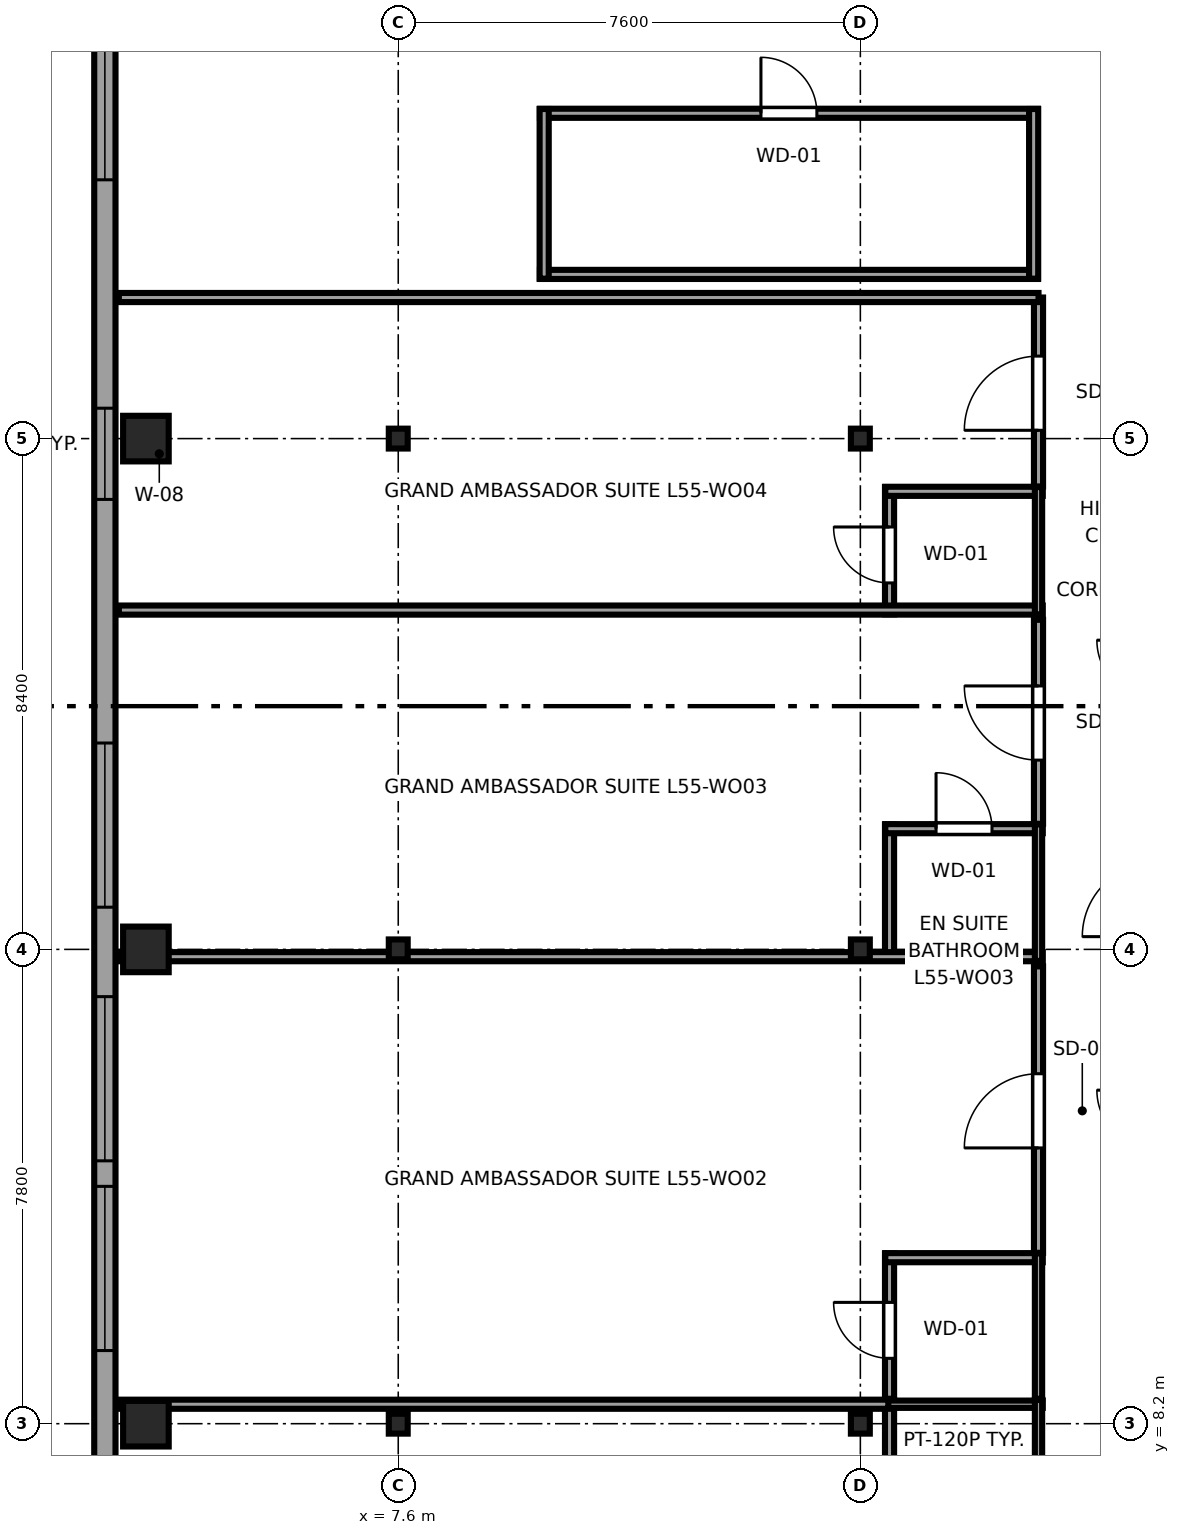
"""IFC4 building model, lengths in metres.
Left out: names, types, materials, properties, quantities, classifications, styles, units other than length and angle.
Written with IfcOpenShell. Run it as: python <this file> out.ifc"""

import sys

from ifc_helpers import new_model, si_unit, direction, frame, frame_2d, origin, origin_2d, place, context, subcontext, project, spatial, rectangle, i_section, extrude, source, transform, mapped, element, fill, save


model = new_model("IFC4")
c1 = context("Model", 3, precision=1e-05, world=origin(), true_north=direction((0.0, 1.0)))
c2 = subcontext(c1, "Body", "Model", "MODEL_VIEW")
j1 = project(units=[si_unit("LENGTHUNIT", "METRE"), si_unit("PLANEANGLEUNIT", "RADIAN")], contexts=[c1])
p1 = place(None, origin())
s1 = spatial("IfcSite", under=j1, at=p1, CompositionType="ELEMENT")
p2 = place(p1, origin())
s2 = spatial("IfcBuilding", under=s1, at=p2, CompositionType="ELEMENT")
p3 = place(p2, frame((0.0, 0.0, 209.7)))
s3 = spatial("IfcBuildingStorey", under=s2, at=p3, CompositionType="ELEMENT", Elevation=209.7)
m1 = source(origin(), c2, "Body", "SweptSolid", [
    extrude(rectangle(XDim=0.75, YDim=0.75, at=origin_2d()), origin(), (0.0, 0.0, 1.0), 3.55),
])
for number, where, z_axis, x_axis in (
    (1, (3.45, 8.2, 0.0), (0.0, 0.0, 1.0), (1.0, 0.0, 0.0)),
    (2, (3.45, 16.0, 0.0), (0.0, 0.0, 1.0), (1.0, 0.0, 0.0)),
    (3, (3.45, 24.4, 0.0), (0.0, 0.0, 1.0), (1.0, 0.0, 0.0)),
):
    element("IfcColumn", number, at=place(p3, frame(where, z_axis=z_axis, x_axis=x_axis)), inside=s3, PredefinedType="COLUMN", context=c2, shape_type="MappedRepresentation", body=[
        mapped(m1, transform((0.0, 0.0, 0.0), x_axis=(1.0, 0.0, 0.0), y_axis=(0.0, 1.0, 0.0), z_axis=(0.0, 0.0, 1.0), scale=1.0)),
    ])
m2 = source(origin(), c2, "Body", "SweptSolid", [
    extrude(i_section(OverallWidth=0.311, OverallDepth=0.327, WebThickness=0.016, FlangeThickness=0.025, FilletRadius=0.017, at=origin_2d()), origin(), (0.0, 0.0, 1.0), 3.55),
])
for number, where, z_axis, x_axis in (
    (4, (7.6, 8.2, 0.0), (0.0, 0.0, 1.0), (1.0, 0.0, 0.0)),
    (5, (7.6, 16.0, 0.0), (0.0, 0.0, 1.0), (1.0, 0.0, 0.0)),
    (6, (7.6, 24.4, 0.0), (0.0, 0.0, 1.0), (1.0, 0.0, 0.0)),
    (7, (15.2, 8.2, 0.0), (0.0, 0.0, 1.0), (1.0, 0.0, 0.0)),
    (8, (15.2, 16.0, 0.0), (0.0, 0.0, 1.0), (1.0, 0.0, 0.0)),
    (9, (15.2, 24.4, 0.0), (0.0, 0.0, 1.0), (1.0, 0.0, 0.0)),
):
    element("IfcColumn", number, at=place(p3, frame(where, z_axis=z_axis, x_axis=x_axis)), inside=s3, PredefinedType="COLUMN", context=c2, shape_type="MappedRepresentation", body=[
        mapped(m2, transform((0.0, 0.0, 0.0), x_axis=(1.0, 0.0, 0.0), y_axis=(0.0, 1.0, 0.0), z_axis=(0.0, 0.0, 1.0), scale=1.0)),
    ])
p4 = place(p3, frame((2.775, 41.583, 0.0), z_axis=(0.0, 0.0, 1.0), x_axis=(0.0, -1.0, 0.0)))
e10 = element("IfcWall", 10, at=p4, inside=s3, PredefinedType="SOLIDWALL", context=c2, shape_type="SweptSolid", body=[
    extrude(rectangle(XDim=34.566, YDim=0.35, at=frame_2d((17.283, 0.0))), origin(), (0.0, 0.0, 1.0), 3.37),
])
p5 = place(p4, frame((10.227, 0.0, 0.68)))
e11 = element("IfcOpeningElement", 11, at=p5, cuts=e10, PredefinedType="OPENING", context=c2, shape_type="SweptSolid", body=[
    extrude(rectangle(XDim=2.7, YDim=1.95, at=frame_2d((1.35, 0.975))), frame((0.0, 0.185, 0.0), z_axis=(0.0, -1.0, 0.0), x_axis=(1.0, 0.0, 0.0)), (0.0, 0.0, 1.0), 0.37),
])
p6 = place(p4, frame((22.189, 0.0, 0.68)))
e12 = element("IfcOpeningElement", 12, at=p6, cuts=e10, PredefinedType="OPENING", context=c2, shape_type="SweptSolid", body=[
    extrude(rectangle(XDim=2.7, YDim=1.95, at=frame_2d((1.35, 0.975))), frame((0.0, 0.185, 0.0), z_axis=(0.0, -1.0, 0.0), x_axis=(1.0, 0.0, 0.0)), (0.0, 0.0, 1.0), 0.37),
])
p7 = place(p4, frame((26.36, 0.0, 0.68)))
e13 = element("IfcOpeningElement", 13, at=p7, cuts=e10, PredefinedType="OPENING", context=c2, shape_type="SweptSolid", body=[
    extrude(rectangle(XDim=2.7, YDim=1.95, at=frame_2d((1.35, 0.975))), frame((0.0, 0.185, 0.0), z_axis=(0.0, -1.0, 0.0), x_axis=(1.0, 0.0, 0.0)), (0.0, 0.0, 1.0), 0.37),
])
p8 = place(p4, frame((29.48, 0.0, 0.68)))
e14 = element("IfcOpeningElement", 14, at=p8, cuts=e10, PredefinedType="OPENING", context=c2, shape_type="SweptSolid", body=[
    extrude(rectangle(XDim=2.7, YDim=1.95, at=frame_2d((1.35, 0.975))), frame((0.0, 0.185, 0.0), z_axis=(0.0, -1.0, 0.0), x_axis=(1.0, 0.0, 0.0)), (0.0, 0.0, 1.0), 0.37),
])
p9 = place(p4, frame((16.683, 0.0, 0.62)))
e15 = element("IfcOpeningElement", 15, at=p9, cuts=e10, PredefinedType="OPENING", context=c2, shape_type="SweptSolid", body=[
    extrude(rectangle(XDim=1.5, YDim=1.55, at=frame_2d((0.75, 0.775))), frame((0.0, 0.185, 0.0), z_axis=(0.0, -1.0, 0.0), x_axis=(1.0, 0.0, 0.0)), (0.0, 0.0, 1.0), 0.37),
])
p10 = place(p3, frame((15.68, 6.383, 0.0), z_axis=(0.0, 0.0, 1.0), x_axis=(0.0, 1.0, 0.0)))
e16 = element("IfcWall", 16, at=p10, inside=s3, PredefinedType="PARTITIONING", context=c2, shape_type="SweptSolid", body=[
    extrude(rectangle(XDim=2.207, YDim=0.15, at=frame_2d((1.104, 0.0))), origin(), (0.0, 0.0, 1.0), 3.37),
])
p11 = place(p3, frame((15.61, 8.52, 0.0), z_axis=(0.0, 0.0, 1.0), x_axis=(1.0, 0.0, 0.0)))
e17 = element("IfcWall", 17, at=p11, inside=s3, PredefinedType="PLUMBINGWALL", context=c2, shape_type="SweptSolid", body=[
    extrude(rectangle(XDim=2.59, YDim=0.12, at=frame_2d((1.295, 0.0))), origin(), (0.0, 0.0, 1.0), 3.37),
])
p12 = place(p3, frame((18.13, 6.383, 0.0), z_axis=(0.0, 0.0, 1.0), x_axis=(0.0, 1.0, 0.0)))
e18 = element("IfcWall", 18, at=p12, inside=s3, PredefinedType="PLUMBINGWALL", context=c2, shape_type="SweptSolid", body=[
    extrude(rectangle(XDim=2.207, YDim=0.12, at=frame_2d((1.104, 0.0))), origin(), (0.0, 0.0, 1.0), 3.37),
])
p13 = place(p3, frame((15.68, 8.61, 0.0), z_axis=(0.0, 0.0, 1.0), x_axis=(0.0, 1.0, 0.0)))
e19 = element("IfcWall", 19, at=p13, inside=s3, PredefinedType="PARTITIONING", context=c2, shape_type="SweptSolid", body=[
    extrude(rectangle(XDim=2.39, YDim=0.15, at=frame_2d((1.195, 0.0))), origin(), (0.0, 0.0, 1.0), 3.37),
])
p14 = place(p13, frame((0.665, 0.0, 0.0)))
e20 = element("IfcOpeningElement", 20, at=p14, cuts=e19, PredefinedType="OPENING", context=c2, shape_type="SweptSolid", body=[
    extrude(rectangle(XDim=0.92, YDim=2.01, at=frame_2d((0.46, 1.005))), frame((0.0, 0.085, 0.0), z_axis=(0.0, -1.0, 0.0), x_axis=(1.0, 0.0, 0.0)), (0.0, 0.0, 1.0), 0.17),
])
p15 = place(p3, frame((15.61, 10.93, 0.0), z_axis=(0.0, 0.0, 1.0), x_axis=(1.0, 0.0, 0.0)))
e21 = element("IfcWall", 21, at=p15, inside=s3, PredefinedType="PARTITIONING", context=c2, shape_type="SweptSolid", body=[
    extrude(rectangle(XDim=2.59, YDim=0.15, at=frame_2d((1.295, 0.0))), origin(), (0.0, 0.0, 1.0), 3.37),
])
p16 = place(p3, frame((18.13, 8.61, 0.0), z_axis=(0.0, 0.0, 1.0), x_axis=(0.0, 1.0, 0.0)))
e22 = element("IfcWall", 22, at=p16, inside=s3, PredefinedType="PLUMBINGWALL", context=c2, shape_type="SweptSolid", body=[
    extrude(rectangle(XDim=2.39, YDim=0.12, at=frame_2d((1.195, 0.0))), origin(), (0.0, 0.0, 1.0), 3.37),
])
p17 = place(p3, frame((15.68, 15.81, 0.0), z_axis=(0.0, 0.0, 1.0), x_axis=(0.0, 1.0, 0.0)))
e23 = element("IfcWall", 23, at=p17, inside=s3, PredefinedType="PARTITIONING", context=c2, shape_type="SweptSolid", body=[
    extrude(rectangle(XDim=2.245, YDim=0.15, at=frame_2d((1.123, 0.0))), origin(), (0.0, 0.0, 1.0), 3.37),
])
p18 = place(p3, frame((3.005, 15.88, 0.0), z_axis=(0.0, 0.0, 1.0), x_axis=(1.0, 0.0, 0.0)))
e24 = element("IfcWall", 24, at=p18, inside=s3, PredefinedType="PARTITIONING", context=c2, shape_type="SweptSolid", body=[
    extrude(rectangle(XDim=15.195, YDim=0.15, at=frame_2d((7.598, 0.0))), origin(), (0.0, 0.0, 1.0), 2.758),
])
p19 = place(p3, frame((15.61, 17.985, 0.0), z_axis=(0.0, 0.0, 1.0), x_axis=(1.0, 0.0, 0.0)))
e25 = element("IfcWall", 25, at=p19, inside=s3, PredefinedType="PARTITIONING", context=c2, shape_type="SweptSolid", body=[
    extrude(rectangle(XDim=2.59, YDim=0.15, at=frame_2d((1.295, 0.0))), origin(), (0.0, 0.0, 1.0), 3.37),
])
p20 = place(p19, frame((0.835, 0.0, 0.0)))
e26 = element("IfcOpeningElement", 26, at=p20, cuts=e25, PredefinedType="OPENING", context=c2, shape_type="SweptSolid", body=[
    extrude(rectangle(XDim=0.92, YDim=2.01, at=frame_2d((0.46, 1.005))), frame((0.0, 0.085, 0.0), z_axis=(0.0, -1.0, 0.0), x_axis=(1.0, 0.0, 0.0)), (0.0, 0.0, 1.0), 0.17),
])
p21 = place(p3, frame((18.13, 15.81, 0.0), z_axis=(0.0, 0.0, 1.0), x_axis=(0.0, 1.0, 0.0)))
e27 = element("IfcWall", 27, at=p21, inside=s3, PredefinedType="PLUMBINGWALL", context=c2, shape_type="SweptSolid", body=[
    extrude(rectangle(XDim=2.245, YDim=0.12, at=frame_2d((1.123, 0.0))), origin(), (0.0, 0.0, 1.0), 3.37),
])
p22 = place(p3, frame((15.68, 21.51, 0.0), z_axis=(0.0, 0.0, 1.0), x_axis=(0.0, 1.0, 0.0)))
e28 = element("IfcWall", 28, at=p22, inside=s3, PredefinedType="PARTITIONING", context=c2, shape_type="SweptSolid", body=[
    extrude(rectangle(XDim=2.093, YDim=0.15, at=frame_2d((1.046, 0.0))), origin(), (0.0, 0.0, 1.0), 3.37),
])
p23 = place(p22, frame((0.517, 0.0, 0.0)))
e29 = element("IfcOpeningElement", 29, at=p23, cuts=e28, PredefinedType="OPENING", context=c2, shape_type="SweptSolid", body=[
    extrude(rectangle(XDim=0.92, YDim=2.01, at=frame_2d((0.46, 1.005))), frame((0.0, 0.085, 0.0), z_axis=(0.0, -1.0, 0.0), x_axis=(1.0, 0.0, 0.0)), (0.0, 0.0, 1.0), 0.17),
])
p24 = place(p3, frame((3.005, 21.58, 0.0), z_axis=(0.0, 0.0, 1.0), x_axis=(1.0, 0.0, 0.0)))
e30 = element("IfcWall", 30, at=p24, inside=s3, PredefinedType="PARTITIONING", context=c2, shape_type="SweptSolid", body=[
    extrude(rectangle(XDim=15.195, YDim=0.15, at=frame_2d((7.598, 0.0))), origin(), (0.0, 0.0, 1.0), 3.37),
])
p25 = place(p3, frame((15.61, 23.533, 0.0), z_axis=(0.0, 0.0, 1.0), x_axis=(1.0, 0.0, 0.0)))
e31 = element("IfcWall", 31, at=p25, inside=s3, PredefinedType="PARTITIONING", context=c2, shape_type="SweptSolid", body=[
    extrude(rectangle(XDim=2.59, YDim=0.15, at=frame_2d((1.295, 0.0))), origin(), (0.0, 0.0, 1.0), 3.37),
])
p26 = place(p3, frame((18.13, 21.51, 0.0), z_axis=(0.0, 0.0, 1.0), x_axis=(0.0, 1.0, 0.0)))
e32 = element("IfcWall", 32, at=p26, inside=s3, PredefinedType="PLUMBINGWALL", context=c2, shape_type="SweptSolid", body=[
    extrude(rectangle(XDim=2.093, YDim=0.12, at=frame_2d((1.046, 0.0))), origin(), (0.0, 0.0, 1.0), 3.37),
])
p27 = place(p3, frame((3.005, 8.52, 0.0), z_axis=(0.0, 0.0, 1.0), x_axis=(1.0, 0.0, 0.0)))
e33 = element("IfcWall", 33, at=p27, inside=s3, PredefinedType="PARTITIONING", context=c2, shape_type="SweptSolid", body=[
    extrude(rectangle(XDim=12.655, YDim=0.15, at=frame_2d((6.328, 0.0))), origin(), (0.0, 0.0, 1.0), 3.37),
])
p28 = place(p3, frame((18.13, 11.01, 0.0), z_axis=(0.0, 0.0, 1.0), x_axis=(0.0, 1.0, 0.0)))
e34 = element("IfcWall", 34, at=p28, inside=s3, PredefinedType="PARTITIONING", context=c2, shape_type="SweptSolid", body=[
    extrude(rectangle(XDim=4.71, YDim=0.15, at=frame_2d((2.355, 0.0))), origin(), (0.0, 0.0, 1.0), 3.37),
])
p29 = place(p28, frame((1.725, 0.0, 0.0)))
e35 = element("IfcOpeningElement", 35, at=p29, cuts=e34, PredefinedType="OPENING", context=c2, shape_type="SweptSolid", body=[
    extrude(rectangle(XDim=1.22, YDim=2.08, at=frame_2d((0.61, 1.04))), frame((0.0, 0.085, 0.0), z_axis=(0.0, -1.0, 0.0), x_axis=(1.0, 0.0, 0.0)), (0.0, 0.0, 1.0), 0.17),
])
p30 = place(p3, frame((18.13, 18.065, 0.0), z_axis=(0.0, 0.0, 1.0), x_axis=(0.0, 1.0, 0.0)))
e36 = element("IfcWall", 36, at=p30, inside=s3, PredefinedType="PARTITIONING", context=c2, shape_type="SweptSolid", body=[
    extrude(rectangle(XDim=3.355, YDim=0.15, at=frame_2d((1.677, 0.0))), origin(), (0.0, 0.0, 1.0), 3.37),
])
p31 = place(p30, frame((1.048, 0.0, 0.0)))
e37 = element("IfcOpeningElement", 37, at=p31, cuts=e36, PredefinedType="OPENING", context=c2, shape_type="SweptSolid", body=[
    extrude(rectangle(XDim=1.22, YDim=2.08, at=frame_2d((0.61, 1.04))), frame((0.0, 0.085, 0.0), z_axis=(0.0, -1.0, 0.0), x_axis=(1.0, 0.0, 0.0)), (0.0, 0.0, 1.0), 0.17),
])
p32 = place(p3, frame((18.13, 23.613, 0.0), z_axis=(0.0, 0.0, 1.0), x_axis=(0.0, 1.0, 0.0)))
e38 = element("IfcWall", 38, at=p32, inside=s3, PredefinedType="PARTITIONING", context=c2, shape_type="SweptSolid", body=[
    extrude(rectangle(XDim=3.107, YDim=0.15, at=frame_2d((1.553, 0.0))), origin(), (0.0, 0.0, 1.0), 3.37),
])
p33 = place(p32, frame((0.924, 0.0, 0.0)))
e39 = element("IfcOpeningElement", 39, at=p33, cuts=e38, PredefinedType="OPENING", context=c2, shape_type="SweptSolid", body=[
    extrude(rectangle(XDim=1.22, YDim=2.08, at=frame_2d((0.61, 1.04))), frame((0.0, 0.085, 0.0), z_axis=(0.0, -1.0, 0.0), x_axis=(1.0, 0.0, 0.0)), (0.0, 0.0, 1.0), 0.17),
])
p34 = place(p3, frame((3.005, 26.72, 0.0), z_axis=(0.0, 0.0, 1.0), x_axis=(1.0, 0.0, 0.0)))
e40 = element("IfcWall", 40, at=p34, inside=s3, PredefinedType="PARTITIONING", context=c2, shape_type="SweptSolid", body=[
    extrude(rectangle(XDim=15.125, YDim=0.15, at=frame_2d((7.562, 0.0))), origin(), (0.0, 0.0, 1.0), 3.37),
])
p35 = place(p3, frame((9.93, 27.1, 0.0), z_axis=(0.0, 0.0, 1.0), x_axis=(1.0, 0.0, 0.0)))
e41 = element("IfcWall", 41, at=p35, inside=s3, PredefinedType="PARTITIONING", context=c2, shape_type="SweptSolid", body=[
    extrude(rectangle(XDim=8.19, YDim=0.15, at=frame_2d((4.095, 0.0))), origin(), (0.0, 0.0, 1.0), 3.37),
])
p36 = place(p3, frame((9.93, 29.75, 0.0), z_axis=(0.0, 0.0, 1.0), x_axis=(1.0, 0.0, 0.0)))
e42 = element("IfcWall", 42, at=p36, inside=s3, PredefinedType="PARTITIONING", context=c2, shape_type="SweptSolid", body=[
    extrude(rectangle(XDim=8.19, YDim=0.15, at=frame_2d((4.095, 0.0))), origin(), (0.0, 0.0, 1.0), 3.37),
])
p37 = place(p36, frame((3.635, 0.0, 0.0)))
e43 = element("IfcOpeningElement", 43, at=p37, cuts=e42, PredefinedType="OPENING", context=c2, shape_type="SweptSolid", body=[
    extrude(rectangle(XDim=0.92, YDim=2.01, at=frame_2d((0.46, 1.005))), frame((0.0, 0.085, 0.0), z_axis=(0.0, -1.0, 0.0), x_axis=(1.0, 0.0, 0.0)), (0.0, 0.0, 1.0), 0.17),
])
for number, where, z_axis, x_axis in (
    (44, (10.0, 27.03, 0.0), (0.0, 0.0, 1.0), (0.0, 1.0, 0.0)),
    (45, (18.05, 27.03, 0.0), (0.0, 0.0, 1.0), (0.0, 1.0, 0.0)),
):
    element("IfcWall", number, at=place(p3, frame(where, z_axis=z_axis, x_axis=x_axis)), inside=s3, PredefinedType="PARTITIONING", context=c2, shape_type="SweptSolid", body=[
        extrude(rectangle(XDim=2.79, YDim=0.15, at=frame_2d((1.395, 0.0))), origin(), (0.0, 0.0, 1.0), 3.37),
    ])
m3 = source(origin(), c2, "Body", "SweptSolid", [
    extrude(rectangle(XDim=2.7, YDim=1.95, at=frame_2d((1.35, 0.975))), frame((0.0, 0.09, 0.0), z_axis=(0.0, -1.0, 0.0), x_axis=(1.0, 0.0, 0.0)), (0.0, 0.0, 1.0), 0.06),
])
p38 = place(p5, origin())
e46 = element("IfcWindow", 46, at=p38, inside=s3, PartitioningType="TRIPLE_PANEL_HORIZONTAL", PredefinedType="WINDOW", context=c2, shape_type="MappedRepresentation", body=[
    mapped(m3, transform((0.0, 0.0, 0.0), x_axis=(1.0, 0.0, 0.0), y_axis=(0.0, 1.0, 0.0), z_axis=(0.0, 0.0, 1.0), scale=1.0)),
])
fill(e11, e46)
p39 = place(p6, origin())
e47 = element("IfcWindow", 47, at=p39, inside=s3, PartitioningType="TRIPLE_PANEL_HORIZONTAL", PredefinedType="WINDOW", context=c2, shape_type="MappedRepresentation", body=[
    mapped(m3, transform((0.0, 0.0, 0.0), x_axis=(1.0, 0.0, 0.0), y_axis=(0.0, 1.0, 0.0), z_axis=(0.0, 0.0, 1.0), scale=1.0)),
])
fill(e12, e47)
p40 = place(p7, origin())
e48 = element("IfcWindow", 48, at=p40, inside=s3, PartitioningType="TRIPLE_PANEL_HORIZONTAL", PredefinedType="WINDOW", context=c2, shape_type="MappedRepresentation", body=[
    mapped(m3, transform((0.0, 0.0, 0.0), x_axis=(1.0, 0.0, 0.0), y_axis=(0.0, 1.0, 0.0), z_axis=(0.0, 0.0, 1.0), scale=1.0)),
])
fill(e13, e48)
p41 = place(p8, origin())
e49 = element("IfcWindow", 49, at=p41, inside=s3, PartitioningType="TRIPLE_PANEL_HORIZONTAL", PredefinedType="WINDOW", context=c2, shape_type="MappedRepresentation", body=[
    mapped(m3, transform((0.0, 0.0, 0.0), x_axis=(1.0, 0.0, 0.0), y_axis=(0.0, 1.0, 0.0), z_axis=(0.0, 0.0, 1.0), scale=1.0)),
])
fill(e14, e49)
m4 = source(origin(), c2, "Body", "SweptSolid", [
    extrude(rectangle(XDim=1.5, YDim=1.55, at=frame_2d((0.75, 0.775))), frame((0.0, 0.09, 0.0), z_axis=(0.0, -1.0, 0.0), x_axis=(1.0, 0.0, 0.0)), (0.0, 0.0, 1.0), 0.06),
])
p42 = place(p9, origin())
e50 = element("IfcWindow", 50, at=p42, inside=s3, PartitioningType="SINGLE_PANEL", PredefinedType="WINDOW", context=c2, shape_type="MappedRepresentation", body=[
    mapped(m4, transform((0.0, 0.0, 0.0), x_axis=(1.0, 0.0, 0.0), y_axis=(0.0, 1.0, 0.0), z_axis=(0.0, 0.0, 1.0), scale=1.0)),
])
fill(e15, e50)
m5 = source(origin(), c2, "Body", "SweptSolid", [
    extrude(rectangle(XDim=0.92, YDim=2.01, at=frame_2d((0.46, 1.005))), frame((0.0, 0.025, 0.0), z_axis=(0.0, -1.0, 0.0), x_axis=(1.0, 0.0, 0.0)), (0.0, 0.0, 1.0), 0.05),
])
p43 = place(p14, origin())
e51 = element("IfcDoor", 51, at=p43, inside=s3, OperationType="SINGLE_SWING_RIGHT", PredefinedType="DOOR", context=c2, shape_type="MappedRepresentation", body=[
    mapped(m5, transform((0.0, 0.0, 0.0), x_axis=(1.0, 0.0, 0.0), y_axis=(0.0, 1.0, 0.0), z_axis=(0.0, 0.0, 1.0), scale=1.0)),
])
fill(e20, e51)
p44 = place(p20, origin())
e52 = element("IfcDoor", 52, at=p44, inside=s3, OperationType="SINGLE_SWING_LEFT", PredefinedType="DOOR", context=c2, shape_type="MappedRepresentation", body=[
    mapped(m5, transform((0.0, 0.0, 0.0), x_axis=(1.0, 0.0, 0.0), y_axis=(0.0, 1.0, 0.0), z_axis=(0.0, 0.0, 1.0), scale=1.0)),
])
fill(e26, e52)
p45 = place(p23, origin())
e53 = element("IfcDoor", 53, at=p45, inside=s3, OperationType="SINGLE_SWING_RIGHT", PredefinedType="DOOR", context=c2, shape_type="MappedRepresentation", body=[
    mapped(m5, transform((0.0, 0.0, 0.0), x_axis=(1.0, 0.0, 0.0), y_axis=(0.0, 1.0, 0.0), z_axis=(0.0, 0.0, 1.0), scale=1.0)),
])
fill(e29, e53)
m6 = source(origin(), c2, "Body", "SweptSolid", [
    extrude(rectangle(XDim=1.22, YDim=2.08, at=frame_2d((0.61, 1.04))), frame((0.0, 0.025, 0.0), z_axis=(0.0, -1.0, 0.0), x_axis=(1.0, 0.0, 0.0)), (0.0, 0.0, 1.0), 0.05),
])
p46 = place(p29, origin())
e54 = element("IfcDoor", 54, at=p46, inside=s3, OperationType="SINGLE_SWING_LEFT", PredefinedType="DOOR", context=c2, shape_type="MappedRepresentation", body=[
    mapped(m6, transform((0.0, 0.0, 0.0), x_axis=(1.0, 0.0, 0.0), y_axis=(0.0, 1.0, 0.0), z_axis=(0.0, 0.0, 1.0), scale=1.0)),
])
fill(e35, e54)
p47 = place(p31, origin())
e55 = element("IfcDoor", 55, at=p47, inside=s3, OperationType="SINGLE_SWING_RIGHT", PredefinedType="DOOR", context=c2, shape_type="MappedRepresentation", body=[
    mapped(m6, transform((0.0, 0.0, 0.0), x_axis=(1.0, 0.0, 0.0), y_axis=(0.0, 1.0, 0.0), z_axis=(0.0, 0.0, 1.0), scale=1.0)),
])
fill(e37, e55)
p48 = place(p33, origin())
e56 = element("IfcDoor", 56, at=p48, inside=s3, OperationType="SINGLE_SWING_LEFT", PredefinedType="DOOR", context=c2, shape_type="MappedRepresentation", body=[
    mapped(m6, transform((0.0, 0.0, 0.0), x_axis=(1.0, 0.0, 0.0), y_axis=(0.0, 1.0, 0.0), z_axis=(0.0, 0.0, 1.0), scale=1.0)),
])
fill(e39, e56)
p49 = place(p37, origin())
e57 = element("IfcDoor", 57, at=p49, inside=s3, OperationType="SINGLE_SWING_LEFT", PredefinedType="DOOR", context=c2, shape_type="MappedRepresentation", body=[
    mapped(m5, transform((0.0, 0.0, 0.0), x_axis=(1.0, 0.0, 0.0), y_axis=(0.0, 1.0, 0.0), z_axis=(0.0, 0.0, 1.0), scale=1.0)),
])
fill(e43, e57)
save(model, sys.argv[1])
